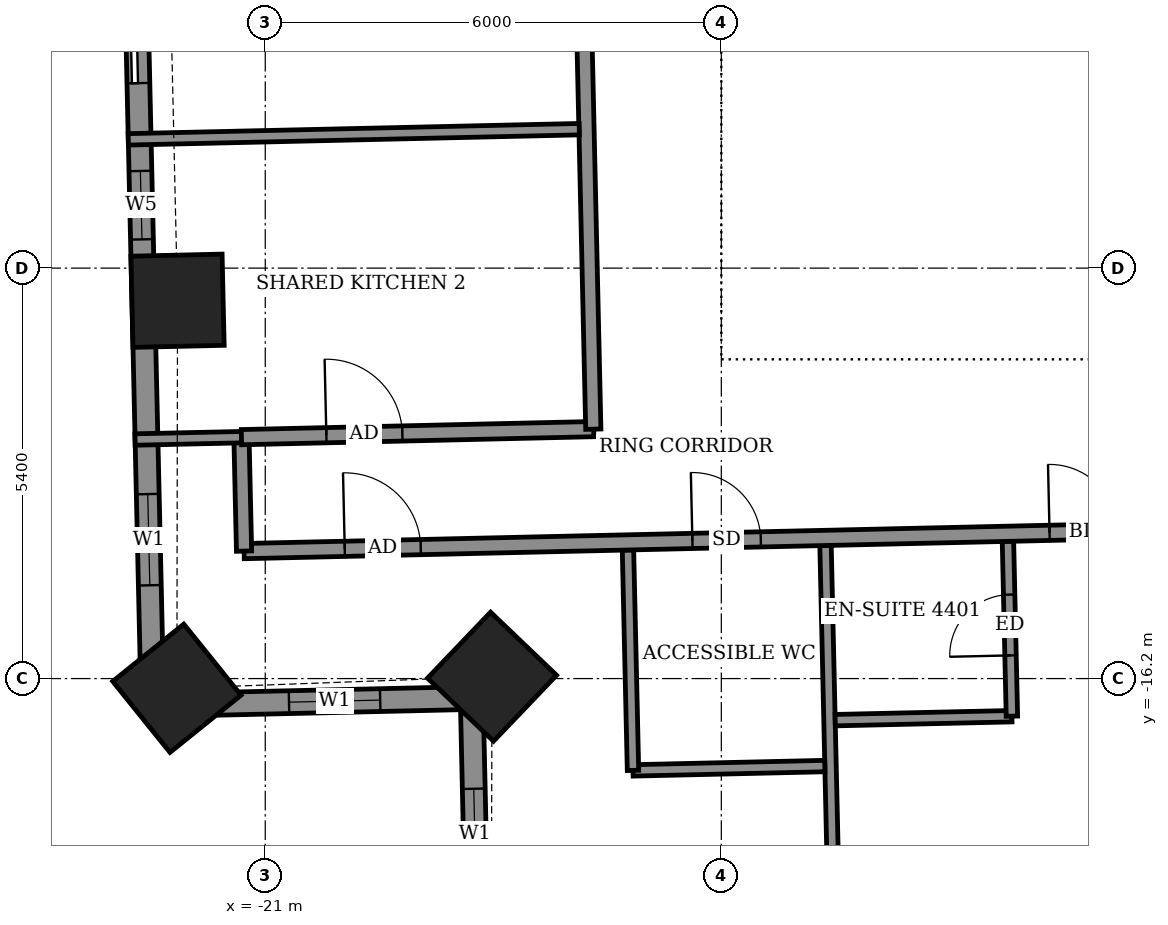
"""IFC4 building model, lengths in metres.
Left out: names, types, materials, properties, quantities, classifications, styles, units other than length and angle.
Written with IfcOpenShell. Run it as: python <this file> out.ifc"""

import sys

from ifc_helpers import new_model, si_unit, direction, frame, frame_2d, origin, origin_2d, place, context, subcontext, project, spatial, rectangle, extrude, element, fill, save


model = new_model("IFC4")
c1 = context("Model", 3, precision=1e-05, world=origin(), true_north=direction((0.0, 1.0)))
c2 = subcontext(c1, "Body", "Model", "MODEL_VIEW")
j1 = project(units=[si_unit("LENGTHUNIT", "METRE"), si_unit("PLANEANGLEUNIT", "RADIAN")], contexts=[c1])
p1 = place(None, origin())
s1 = spatial("IfcSite", under=j1, at=p1, CompositionType="ELEMENT")
p2 = place(p1, origin())
s2 = spatial("IfcBuilding", under=s1, at=p2, CompositionType="ELEMENT")
p3 = place(p2, frame((0.0, 0.0, 175.3)))
s3 = spatial("IfcBuildingStorey", under=s2, at=p3, CompositionType="ELEMENT", Elevation=175.3)
for number, where, z_axis, x_axis in (
    (1, (-22.154, -11.229, -0.55), (0.0, 0.0, 1.0), (0.023, -1.0, 0.0)),
    (2, (-22.163, -16.328, -0.55), (0.0, 0.0, 1.0), (0.627, -0.779, 0.0)),
    (3, (-18.016, -16.175, -0.55), (0.0, 0.0, 1.0), (0.723, -0.691, 0.0)),
):
    element("IfcColumn", number, at=place(p3, frame(where, z_axis=z_axis, x_axis=x_axis)), inside=s3, PredefinedType="COLUMN", context=c2, shape_type="SweptSolid", body=[
        extrude(rectangle(XDim=1.2, YDim=1.2, at=origin_2d()), origin(), (0.0, 0.0, 1.0), 3.6),
    ])
p4 = place(p3, frame((-22.729, -5.725, 0.0), z_axis=(0.0, 0.0, 1.0), x_axis=(0.022726014582, -0.999741730779, 0.0)))
e4 = element("IfcWall", 4, at=p4, inside=s3, PredefinedType="SOLIDWALL", context=c2, shape_type="SweptSolid", body=[
    extrude(rectangle(XDim=10.829, YDim=0.3, at=frame_2d((5.414, 0.0))), origin(), (0.0, 0.0, 1.0), 3.05),
])
p5 = place(p4, frame((1.142, 0.0, 0.0)))
e5 = element("IfcOpeningElement", 5, at=p5, cuts=e4, PredefinedType="OPENING", context=c2, shape_type="SweptSolid", body=[
    extrude(rectangle(XDim=1.5, YDim=2.4, at=frame_2d((0.75, 1.2))), frame((0.0, 0.16, 0.0), z_axis=(0.0, -1.0, 0.0), x_axis=(1.0, 0.0, 0.0)), (0.0, 0.0, 1.0), 0.32),
])
p6 = place(p4, frame((3.798, 0.0, 0.9)))
e6 = element("IfcOpeningElement", 6, at=p6, cuts=e4, PredefinedType="OPENING", context=c2, shape_type="SweptSolid", body=[
    extrude(rectangle(XDim=0.9, YDim=1.5, at=frame_2d((0.45, 0.75))), frame((0.0, 0.16, 0.0), z_axis=(0.0, -1.0, 0.0), x_axis=(1.0, 0.0, 0.0)), (0.0, 0.0, 1.0), 0.32),
])
p7 = place(p4, frame((8.05, 0.0, 0.9)))
e7 = element("IfcOpeningElement", 7, at=p7, cuts=e4, PredefinedType="OPENING", context=c2, shape_type="SweptSolid", body=[
    extrude(rectangle(XDim=1.2, YDim=1.5, at=frame_2d((0.6, 0.75))), frame((0.0, 0.16, 0.0), z_axis=(0.0, -1.0, 0.0), x_axis=(1.0, 0.0, 0.0)), (0.0, 0.0, 1.0), 0.32),
])
p8 = place(p3, frame((-22.483, -16.551, 0.0), z_axis=(0.0, 0.0, 1.0), x_axis=(0.999744320311, 0.022611811187, 0.0)))
e8 = element("IfcWall", 8, at=p8, inside=s3, PredefinedType="SOLIDWALL", context=c2, shape_type="SweptSolid", body=[
    extrude(rectangle(XDim=4.2, YDim=0.3, at=frame_2d((2.1, 0.0))), origin(), (0.0, 0.0, 1.0), 2.55),
])
p9 = place(p8, frame((1.796, 0.0, 0.9)))
e9 = element("IfcOpeningElement", 9, at=p9, cuts=e8, PredefinedType="OPENING", context=c2, shape_type="SweptSolid", body=[
    extrude(rectangle(XDim=1.2, YDim=1.5, at=frame_2d((0.6, 0.75))), frame((0.0, 0.16, 0.0), z_axis=(0.0, -1.0, 0.0), x_axis=(1.0, 0.0, 0.0)), (0.0, 0.0, 1.0), 0.32),
])
p10 = place(p3, frame((-18.284, -16.456, 0.0), z_axis=(0.0, 0.0, 1.0), x_axis=(0.022611811187, -0.999744320311, 0.0)))
e10 = element("IfcWall", 10, at=p10, inside=s3, PredefinedType="SOLIDWALL", context=c2, shape_type="SweptSolid", body=[
    extrude(rectangle(XDim=4.2, YDim=0.3, at=frame_2d((2.1, 0.0))), origin(), (0.0, 0.0, 1.0), 2.55),
])
p11 = place(p10, frame((1.194, 0.0, 0.9)))
e11 = element("IfcOpeningElement", 11, at=p11, cuts=e10, PredefinedType="OPENING", context=c2, shape_type="SweptSolid", body=[
    extrude(rectangle(XDim=1.2, YDim=1.5, at=frame_2d((0.6, 0.75))), frame((0.0, 0.16, 0.0), z_axis=(0.0, -1.0, 0.0), x_axis=(1.0, 0.0, 0.0)), (0.0, 0.0, 1.0), 0.32),
])
p12 = place(p3, frame((-13.494, -20.398, 0.0), z_axis=(0.0, 0.0, 1.0), x_axis=(-0.022692509051, 0.999742491861, 0.0)))
e12 = element("IfcWall", 12, at=p12, inside=s3, PredefinedType="PARTITIONING", context=c2, shape_type="SweptSolid", body=[
    extrude(rectangle(XDim=5.949, YDim=0.15, at=frame_2d((2.975, 0.0))), origin(), (0.0, 0.0, 1.0), 2.55),
])
p13 = place(p3, frame((-16.162, -17.408, 0.0), z_axis=(0.0, 0.0, 1.0), x_axis=(0.999746160391, 0.022530308093, 0.0)))
e13 = element("IfcWall", 13, at=p13, inside=s3, PredefinedType="PARTITIONING", context=c2, shape_type="SweptSolid", body=[
    extrude(rectangle(XDim=2.525, YDim=0.15, at=frame_2d((1.262, 0.0))), origin(), (0.0, 0.0, 1.0), 3.05),
])
p14 = place(p3, frame((-16.162, -17.408, 0.0), z_axis=(0.0, 0.0, 1.0), x_axis=(-0.022732880677, 0.999741574676, 0.0)))
e14 = element("IfcWall", 14, at=p14, inside=s3, PredefinedType="PARTITIONING", context=c2, shape_type="SweptSolid", body=[
    extrude(rectangle(XDim=2.9, YDim=0.15, at=frame_2d((1.45, 0.0))), origin(), (0.0, 0.0, 1.0), 3.05),
])
p15 = place(p3, frame((-13.502, -16.747, 0.0), z_axis=(0.0, 0.0, 1.0), x_axis=(0.999749954681, 0.022361308448, 0.0)))
e15 = element("IfcWall", 15, at=p15, inside=s3, PredefinedType="PARTITIONING", context=c2, shape_type="SweptSolid", body=[
    extrude(rectangle(XDim=2.325, YDim=0.15, at=frame_2d((1.163, 0.0))), origin(), (0.0, 0.0, 1.0), 3.05),
])
p16 = place(p3, frame((-11.177, -16.695, 0.0), z_axis=(0.0, 0.0, 1.0), x_axis=(-0.022603288534, 0.999744513037, 0.0)))
e16 = element("IfcWall", 16, at=p16, inside=s3, PredefinedType="PARTITIONING", context=c2, shape_type="SweptSolid", body=[
    extrude(rectangle(XDim=2.301, YDim=0.15, at=frame_2d((1.15, 0.0))), origin(), (0.0, 0.0, 1.0), 3.05),
])
p17 = place(p16, frame((0.8, 0.0, 0.0)))
e17 = element("IfcOpeningElement", 17, at=p17, cuts=e16, PredefinedType="OPENING", context=c2, shape_type="SweptSolid", body=[
    extrude(rectangle(XDim=0.8, YDim=2.1, at=frame_2d((0.4, 1.05))), frame((0.0, 0.085, 0.0), z_axis=(0.0, -1.0, 0.0), x_axis=(1.0, 0.0, 0.0)), (0.0, 0.0, 1.0), 0.17),
])
p18 = place(p3, frame((-21.279, -14.523, 0.0), z_axis=(0.0, 0.0, 1.0), x_axis=(0.999742878501, 0.022675468818, 0.0)))
e18 = element("IfcWall", 18, at=p18, inside=s3, PredefinedType="PARTITIONING", context=c2, shape_type="SweptSolid", body=[
    extrude(rectangle(XDim=46.48, YDim=0.2, at=frame_2d((23.24, 0.0))), origin(), (0.0, 0.0, 1.0), 3.05),
])
p19 = place(p18, frame((1.325, 0.0, 0.0)))
e19 = element("IfcOpeningElement", 19, at=p19, cuts=e18, PredefinedType="OPENING", context=c2, shape_type="SweptSolid", body=[
    extrude(rectangle(XDim=1.0, YDim=2.1, at=frame_2d((0.5, 1.05))), frame((0.0, 0.11, 0.0), z_axis=(0.0, -1.0, 0.0), x_axis=(1.0, 0.0, 0.0)), (0.0, 0.0, 1.0), 0.22),
])
p20 = place(p18, frame((5.9, 0.0, 0.0)))
e20 = element("IfcOpeningElement", 20, at=p20, cuts=e18, PredefinedType="OPENING", context=c2, shape_type="SweptSolid", body=[
    extrude(rectangle(XDim=0.9, YDim=2.1, at=frame_2d((0.45, 1.05))), frame((0.0, 0.11, 0.0), z_axis=(0.0, -1.0, 0.0), x_axis=(1.0, 0.0, 0.0)), (0.0, 0.0, 1.0), 0.22),
])
p21 = place(p18, frame((10.6, 0.0, 0.0)))
e21 = element("IfcOpeningElement", 21, at=p21, cuts=e18, PredefinedType="OPENING", context=c2, shape_type="SweptSolid", body=[
    extrude(rectangle(XDim=0.9, YDim=2.1, at=frame_2d((0.45, 1.05))), frame((0.0, 0.11, 0.0), z_axis=(0.0, -1.0, 0.0), x_axis=(1.0, 0.0, 0.0)), (0.0, 0.0, 1.0), 0.22),
])
p22 = place(p18, frame((12.525, 0.0, 0.0)))
e22 = element("IfcOpeningElement", 22, at=p22, cuts=e18, PredefinedType="OPENING", context=c2, shape_type="SweptSolid", body=[
    extrude(rectangle(XDim=0.9, YDim=2.1, at=frame_2d((0.45, 1.05))), frame((0.0, 0.11, 0.0), z_axis=(0.0, -1.0, 0.0), x_axis=(1.0, 0.0, 0.0)), (0.0, 0.0, 1.0), 0.22),
])
p23 = place(p18, frame((19.175, 0.0, 0.0)))
e23 = element("IfcOpeningElement", 23, at=p23, cuts=e18, PredefinedType="OPENING", context=c2, shape_type="SweptSolid", body=[
    extrude(rectangle(XDim=0.9, YDim=2.1, at=frame_2d((0.45, 1.05))), frame((0.0, 0.11, 0.0), z_axis=(0.0, -1.0, 0.0), x_axis=(1.0, 0.0, 0.0)), (0.0, 0.0, 1.0), 0.22),
])
p24 = place(p18, frame((21.05, 0.0, 0.0)))
e24 = element("IfcOpeningElement", 24, at=p24, cuts=e18, PredefinedType="OPENING", context=c2, shape_type="SweptSolid", body=[
    extrude(rectangle(XDim=0.9, YDim=2.1, at=frame_2d((0.45, 1.05))), frame((0.0, 0.11, 0.0), z_axis=(0.0, -1.0, 0.0), x_axis=(1.0, 0.0, 0.0)), (0.0, 0.0, 1.0), 0.22),
])
p25 = place(p18, frame((27.725, 0.0, 0.0)))
e25 = element("IfcOpeningElement", 25, at=p25, cuts=e18, PredefinedType="OPENING", context=c2, shape_type="SweptSolid", body=[
    extrude(rectangle(XDim=0.9, YDim=2.1, at=frame_2d((0.45, 1.05))), frame((0.0, 0.11, 0.0), z_axis=(0.0, -1.0, 0.0), x_axis=(1.0, 0.0, 0.0)), (0.0, 0.0, 1.0), 0.22),
])
p26 = place(p18, frame((29.6, 0.0, 0.0)))
e26 = element("IfcOpeningElement", 26, at=p26, cuts=e18, PredefinedType="OPENING", context=c2, shape_type="SweptSolid", body=[
    extrude(rectangle(XDim=0.9, YDim=2.1, at=frame_2d((0.45, 1.05))), frame((0.0, 0.11, 0.0), z_axis=(0.0, -1.0, 0.0), x_axis=(1.0, 0.0, 0.0)), (0.0, 0.0, 1.0), 0.22),
])
p27 = place(p18, frame((36.325, 0.0, 0.0)))
e27 = element("IfcOpeningElement", 27, at=p27, cuts=e18, PredefinedType="OPENING", context=c2, shape_type="SweptSolid", body=[
    extrude(rectangle(XDim=0.9, YDim=2.1, at=frame_2d((0.45, 1.05))), frame((0.0, 0.11, 0.0), z_axis=(0.0, -1.0, 0.0), x_axis=(1.0, 0.0, 0.0)), (0.0, 0.0, 1.0), 0.22),
])
p28 = place(p18, frame((43.915, 0.0, 0.0)))
e28 = element("IfcOpeningElement", 28, at=p28, cuts=e18, PredefinedType="OPENING", context=c2, shape_type="SweptSolid", body=[
    extrude(rectangle(XDim=1.0, YDim=2.1, at=frame_2d((0.5, 1.05))), frame((0.0, 0.11, 0.0), z_axis=(0.0, -1.0, 0.0), x_axis=(1.0, 0.0, 0.0)), (0.0, 0.0, 1.0), 0.22),
])
p29 = place(p18, frame((38.6, 0.0, 0.0)))
e29 = element("IfcOpeningElement", 29, at=p29, cuts=e18, PredefinedType="OPENING", context=c2, shape_type="SweptSolid", body=[
    extrude(rectangle(XDim=0.9, YDim=2.1, at=frame_2d((0.45, 1.05))), frame((0.0, 0.11, 0.0), z_axis=(0.0, -1.0, 0.0), x_axis=(1.0, 0.0, 0.0)), (0.0, 0.0, 1.0), 0.22),
])
p30 = place(p3, frame((-21.279, -14.523, 0.0), z_axis=(0.0, 0.0, 1.0), x_axis=(-0.022632637625, 0.99974384905, 0.0)))
e30 = element("IfcWall", 30, at=p30, inside=s3, PredefinedType="PARTITIONING", context=c2, shape_type="SweptSolid", body=[
    extrude(rectangle(XDim=1.5, YDim=0.2, at=frame_2d((0.75, 0.0))), origin(), (0.0, 0.0, 1.0), 3.05),
])
p31 = place(p3, frame((-22.713, -13.055, 0.0), z_axis=(0.0, 0.0, 1.0), x_axis=(0.999756172383, 0.022081571112, 0.0)))
e31 = element("IfcWall", 31, at=p31, inside=s3, PredefinedType="PARTITIONING", context=c2, shape_type="SweptSolid", body=[
    extrude(rectangle(XDim=1.404, YDim=0.15, at=frame_2d((0.702, 0.0))), origin(), (0.0, 0.0, 1.0), 2.55),
])
p32 = place(p3, frame((-21.313, -13.024, 0.0), z_axis=(0.0, 0.0, 1.0), x_axis=(0.999738699021, 0.022858995594, 0.0)))
e32 = element("IfcWall", 32, at=p32, inside=s3, PredefinedType="PARTITIONING", context=c2, shape_type="SweptSolid", body=[
    extrude(rectangle(XDim=4.635, YDim=0.2, at=frame_2d((2.318, 0.0))), origin(), (0.0, 0.0, 1.0), 3.05),
])
p33 = place(p32, frame((1.117, 0.0, 0.0)))
e33 = element("IfcOpeningElement", 33, at=p33, cuts=e32, PredefinedType="OPENING", context=c2, shape_type="SweptSolid", body=[
    extrude(rectangle(XDim=1.0, YDim=2.1, at=frame_2d((0.5, 1.05))), frame((0.0, 0.11, 0.0), z_axis=(0.0, -1.0, 0.0), x_axis=(1.0, 0.0, 0.0)), (0.0, 0.0, 1.0), 0.22),
])
p34 = place(p3, frame((-16.684, -12.919, 0.0), z_axis=(0.0, 0.0, 1.0), x_axis=(-0.022694293906, 0.999742451346, 0.0)))
e34 = element("IfcWall", 34, at=p34, inside=s3, PredefinedType="PARTITIONING", context=c2, shape_type="SweptSolid", body=[
    extrude(rectangle(XDim=28.024, YDim=0.2, at=frame_2d((14.012, 0.0))), origin(), (0.0, 0.0, 1.0), 3.05),
])
p35 = place(p34, frame((22.625, 0.0, 0.0)))
e35 = element("IfcOpeningElement", 35, at=p35, cuts=e34, PredefinedType="OPENING", context=c2, shape_type="SweptSolid", body=[
    extrude(rectangle(XDim=1.0, YDim=2.1, at=frame_2d((0.5, 1.05))), frame((0.0, 0.11, 0.0), z_axis=(0.0, -1.0, 0.0), x_axis=(1.0, 0.0, 0.0)), (0.0, 0.0, 1.0), 0.22),
])
p36 = place(p34, frame((26.174, 0.0, 0.0)))
e36 = element("IfcOpeningElement", 36, at=p36, cuts=e34, PredefinedType="OPENING", context=c2, shape_type="SweptSolid", body=[
    extrude(rectangle(XDim=0.9, YDim=2.1, at=frame_2d((0.45, 1.05))), frame((0.0, 0.11, 0.0), z_axis=(0.0, -1.0, 0.0), x_axis=(1.0, 0.0, 0.0)), (0.0, 0.0, 1.0), 0.22),
])
p37 = place(p34, frame((16.432, 0.0, 0.0)))
e37 = element("IfcOpeningElement", 37, at=p37, cuts=e34, PredefinedType="OPENING", context=c2, shape_type="SweptSolid", body=[
    extrude(rectangle(XDim=1.0, YDim=2.1, at=frame_2d((0.5, 1.05))), frame((0.0, 0.11, 0.0), z_axis=(0.0, -1.0, 0.0), x_axis=(1.0, 0.0, 0.0)), (0.0, 0.0, 1.0), 0.22),
])
p38 = place(p34, frame((10.975, 0.0, 0.0)))
e38 = element("IfcOpeningElement", 38, at=p38, cuts=e34, PredefinedType="OPENING", context=c2, shape_type="SweptSolid", body=[
    extrude(rectangle(XDim=1.0, YDim=2.1, at=frame_2d((0.5, 1.05))), frame((0.0, 0.11, 0.0), z_axis=(0.0, -1.0, 0.0), x_axis=(1.0, 0.0, 0.0)), (0.0, 0.0, 1.0), 0.22),
])
p39 = place(p34, frame((8.025, 0.0, 0.0)))
e39 = element("IfcOpeningElement", 39, at=p39, cuts=e34, PredefinedType="OPENING", context=c2, shape_type="SweptSolid", body=[
    extrude(rectangle(XDim=0.9, YDim=2.1, at=frame_2d((0.45, 1.05))), frame((0.0, 0.11, 0.0), z_axis=(0.0, -1.0, 0.0), x_axis=(1.0, 0.0, 0.0)), (0.0, 0.0, 1.0), 0.22),
])
p40 = place(p34, frame((5.113, 0.0, 0.0)))
e40 = element("IfcOpeningElement", 40, at=p40, cuts=e34, PredefinedType="OPENING", context=c2, shape_type="SweptSolid", body=[
    extrude(rectangle(XDim=1.0, YDim=2.1, at=frame_2d((0.5, 1.05))), frame((0.0, 0.11, 0.0), z_axis=(0.0, -1.0, 0.0), x_axis=(1.0, 0.0, 0.0)), (0.0, 0.0, 1.0), 0.22),
])
p41 = place(p3, frame((-22.802, -9.106, 0.0), z_axis=(0.0, 0.0, 1.0), x_axis=(0.999744927012, 0.022584970987, 0.0)))
e41 = element("IfcWall", 41, at=p41, inside=s3, PredefinedType="PARTITIONING", context=c2, shape_type="SweptSolid", body=[
    extrude(rectangle(XDim=5.935, YDim=0.15, at=frame_2d((2.967, 0.0))), origin(), (0.0, 0.0, 1.0), 2.55),
])
p42 = place(p3, frame((-14.7, -11.25, 0.0), z_axis=(0.0, 0.0, 1.0), x_axis=(1.0, 0.0, 0.0)))
e42 = element("IfcWall", 42, at=p42, inside=s3, PredefinedType="SHEAR", context=c2, shape_type="SweptSolid", body=[
    extrude(rectangle(XDim=29.4, YDim=0.9, at=frame_2d((14.7, 0.0))), origin(), (0.0, 0.0, 1.0), 3.6),
])
p43 = place(p3, frame((-14.25, -10.8, 0.0), z_axis=(0.0, 0.0, 1.0), x_axis=(0.0, 1.0, 0.0)))
e43 = element("IfcWall", 43, at=p43, inside=s3, PredefinedType="SHEAR", context=c2, shape_type="SweptSolid", body=[
    extrude(rectangle(XDim=21.6, YDim=0.9, at=frame_2d((10.8, 0.0))), origin(), (0.0, 0.0, 1.0), 3.6),
])
p44 = place(p43, frame((8.25, 0.0, 0.0)))
e44 = element("IfcOpeningElement", 44, at=p44, cuts=e43, PredefinedType="OPENING", context=c2, shape_type="SweptSolid", body=[
    extrude(rectangle(XDim=1.2, YDim=2.1, at=frame_2d((0.6, 1.05))), frame((0.0, 0.46, 0.0), z_axis=(0.0, -1.0, 0.0), x_axis=(1.0, 0.0, 0.0)), (0.0, 0.0, 1.0), 0.92),
])
p45 = place(p43, frame((15.25, 0.0, 0.0)))
e45 = element("IfcOpeningElement", 45, at=p45, cuts=e43, PredefinedType="OPENING", context=c2, shape_type="SweptSolid", body=[
    extrude(rectangle(XDim=1.2, YDim=2.1, at=frame_2d((0.6, 1.05))), frame((0.0, 0.46, 0.0), z_axis=(0.0, -1.0, 0.0), x_axis=(1.0, 0.0, 0.0)), (0.0, 0.0, 1.0), 0.92),
])
p46 = place(p3, frame((-10.8, -10.8, 0.0), z_axis=(0.0, 0.0, 1.0), x_axis=(0.0, 1.0, 0.0)))
e46 = element("IfcWall", 46, at=p46, inside=s3, PredefinedType="SHEAR", context=c2, shape_type="SweptSolid", body=[
    extrude(rectangle(XDim=7.5, YDim=0.2, at=frame_2d((3.75, 0.0))), origin(), (0.0, 0.0, 1.0), 3.05),
])
p47 = place(p5, origin())
e47 = element("IfcDoor", 47, at=p47, inside=s3, OperationType="SLIDING_TO_LEFT", PredefinedType="DOOR", context=c2, shape_type="SweptSolid", body=[
    extrude(rectangle(XDim=1.5, YDim=2.4, at=frame_2d((0.75, 1.2))), frame((0.0, 0.025, 0.0), z_axis=(0.0, -1.0, 0.0), x_axis=(1.0, 0.0, 0.0)), (0.0, 0.0, 1.0), 0.05),
])
fill(e5, e47)
p48 = place(p6, origin())
e48 = element("IfcWindow", 48, at=p48, inside=s3, PartitioningType="SINGLE_PANEL", PredefinedType="WINDOW", context=c2, shape_type="SweptSolid", body=[
    extrude(rectangle(XDim=0.9, YDim=1.5, at=frame_2d((0.45, 0.75))), frame((0.0, 0.03, 0.0), z_axis=(0.0, -1.0, 0.0), x_axis=(1.0, 0.0, 0.0)), (0.0, 0.0, 1.0), 0.06),
])
fill(e6, e48)
p49 = place(p7, origin())
e49 = element("IfcWindow", 49, at=p49, inside=s3, PartitioningType="SINGLE_PANEL", PredefinedType="WINDOW", context=c2, shape_type="SweptSolid", body=[
    extrude(rectangle(XDim=1.2, YDim=1.5, at=frame_2d((0.6, 0.75))), frame((0.0, 0.03, 0.0), z_axis=(0.0, -1.0, 0.0), x_axis=(1.0, 0.0, 0.0)), (0.0, 0.0, 1.0), 0.06),
])
fill(e7, e49)
p50 = place(p9, origin())
e50 = element("IfcWindow", 50, at=p50, inside=s3, PartitioningType="SINGLE_PANEL", PredefinedType="WINDOW", context=c2, shape_type="SweptSolid", body=[
    extrude(rectangle(XDim=1.2, YDim=1.5, at=frame_2d((0.6, 0.75))), frame((0.0, 0.03, 0.0), z_axis=(0.0, -1.0, 0.0), x_axis=(1.0, 0.0, 0.0)), (0.0, 0.0, 1.0), 0.06),
])
fill(e9, e50)
p51 = place(p11, origin())
e51 = element("IfcWindow", 51, at=p51, inside=s3, PartitioningType="SINGLE_PANEL", PredefinedType="WINDOW", context=c2, shape_type="SweptSolid", body=[
    extrude(rectangle(XDim=1.2, YDim=1.5, at=frame_2d((0.6, 0.75))), frame((0.0, 0.03, 0.0), z_axis=(0.0, -1.0, 0.0), x_axis=(1.0, 0.0, 0.0)), (0.0, 0.0, 1.0), 0.06),
])
fill(e11, e51)
p52 = place(p19, origin())
e52 = element("IfcDoor", 52, at=p52, inside=s3, OperationType="SINGLE_SWING_LEFT", PredefinedType="DOOR", context=c2, shape_type="SweptSolid", body=[
    extrude(rectangle(XDim=1.0, YDim=2.1, at=frame_2d((0.5, 1.05))), frame((0.0, 0.025, 0.0), z_axis=(0.0, -1.0, 0.0), x_axis=(1.0, 0.0, 0.0)), (0.0, 0.0, 1.0), 0.05),
])
fill(e19, e52)
p53 = place(p20, origin())
e53 = element("IfcDoor", 53, at=p53, inside=s3, OperationType="SINGLE_SWING_LEFT", PredefinedType="DOOR", context=c2, shape_type="SweptSolid", body=[
    extrude(rectangle(XDim=0.9, YDim=2.1, at=frame_2d((0.45, 1.05))), frame((0.0, 0.025, 0.0), z_axis=(0.0, -1.0, 0.0), x_axis=(1.0, 0.0, 0.0)), (0.0, 0.0, 1.0), 0.05),
])
fill(e20, e53)
p54 = place(p21, origin())
e54 = element("IfcDoor", 54, at=p54, inside=s3, OperationType="SINGLE_SWING_LEFT", PredefinedType="DOOR", context=c2, shape_type="SweptSolid", body=[
    extrude(rectangle(XDim=0.9, YDim=2.1, at=frame_2d((0.45, 1.05))), frame((0.0, 0.025, 0.0), z_axis=(0.0, -1.0, 0.0), x_axis=(1.0, 0.0, 0.0)), (0.0, 0.0, 1.0), 0.05),
])
fill(e21, e54)
p55 = place(p17, origin())
e55 = element("IfcDoor", 55, at=p55, inside=s3, OperationType="SINGLE_SWING_LEFT", PredefinedType="DOOR", context=c2, shape_type="SweptSolid", body=[
    extrude(rectangle(XDim=0.8, YDim=2.1, at=frame_2d((0.4, 1.05))), frame((0.0, 0.025, 0.0), z_axis=(0.0, -1.0, 0.0), x_axis=(1.0, 0.0, 0.0)), (0.0, 0.0, 1.0), 0.05),
])
fill(e17, e55)
p56 = place(p33, origin())
e56 = element("IfcDoor", 56, at=p56, inside=s3, OperationType="SINGLE_SWING_LEFT", PredefinedType="DOOR", context=c2, shape_type="SweptSolid", body=[
    extrude(rectangle(XDim=1.0, YDim=2.1, at=frame_2d((0.5, 1.05))), frame((0.0, 0.025, 0.0), z_axis=(0.0, -1.0, 0.0), x_axis=(1.0, 0.0, 0.0)), (0.0, 0.0, 1.0), 0.05),
])
fill(e33, e56)
save(model, sys.argv[1])
